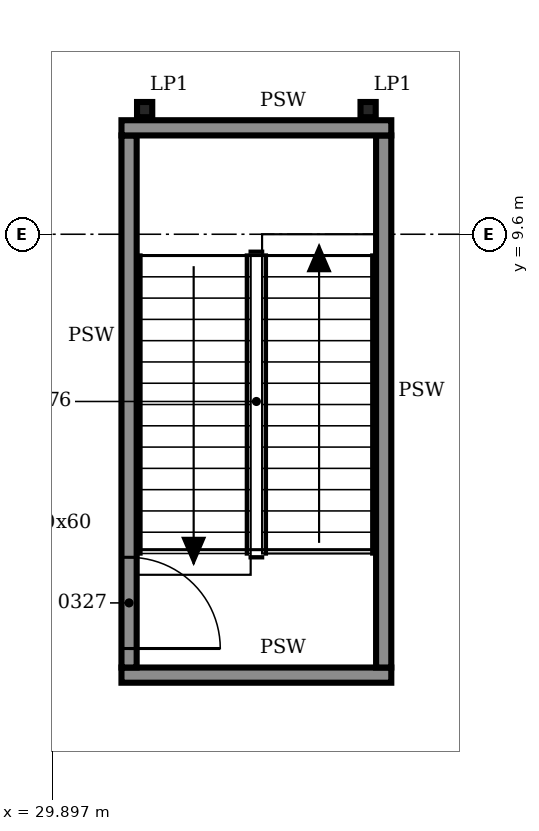
"""IFC4 building model, lengths in metres.
Left out: names, types, materials, properties, quantities, classifications, styles, units other than length and angle.
Written with IfcOpenShell. Run it as: python <this file> out.ifc"""

import sys

from ifc_helpers import new_model, si_unit, direction, frame, frame_2d, origin, origin_2d, place, context, subcontext, project, spatial, rectangle, i_section, extrude, element, fill, save


model = new_model("IFC4")
c1 = context("Model", 3, precision=1e-05, world=origin(), true_north=direction((0.0, 1.0)))
c2 = subcontext(c1, "Body", "Model", "MODEL_VIEW")
j1 = project(units=[si_unit("LENGTHUNIT", "METRE"), si_unit("PLANEANGLEUNIT", "RADIAN")], contexts=[c1])
p1 = place(None, origin())
s1 = spatial("IfcSite", under=j1, at=p1, CompositionType="ELEMENT")
p2 = place(p1, origin())
s2 = spatial("IfcBuilding", under=s1, at=p2, CompositionType="ELEMENT")
p3 = place(p2, frame((0.0, 0.0, 21.0)))
s3 = spatial("IfcBuildingStorey", under=s2, at=p3, CompositionType="ELEMENT", Elevation=21.0)
for number, where, z_axis, x_axis in (
    (1, (31.105, 11.24, 0.0), (0.0, 0.0, 1.0), (1.0, 0.0, 0.0)),
    (2, (34.045, 11.24, 0.0), (0.0, 0.0, 1.0), (1.0, 0.0, 0.0)),
):
    element("IfcColumn", number, at=place(p3, frame(where, z_axis=z_axis, x_axis=x_axis)), inside=s3, PredefinedType="COLUMN", context=c2, shape_type="SweptSolid", body=[
        extrude(i_section(OverallWidth=0.2, OverallDepth=0.2, WebThickness=0.009, FlangeThickness=0.015, FilletRadius=0.018, at=origin_2d()), origin(), (0.0, 0.0, 1.0), 4.8),
    ])
p4 = place(p3, frame((30.8, 3.8, 0.0), z_axis=(0.0, 0.0, 1.0), x_axis=(1.0, 0.0, 0.0)))
e3 = element("IfcWall", 3, at=p4, inside=s3, PredefinedType="SOLIDWALL", context=c2, shape_type="SweptSolid", body=[
    extrude(rectangle(XDim=3.55, YDim=0.2, at=frame_2d((1.775, 0.0))), origin(), (0.0, 0.0, 1.0), 4.6),
])
p5 = place(p3, frame((30.9, 3.9, 0.0), z_axis=(0.0, 0.0, 1.0), x_axis=(0.0, 1.0, 0.0)))
e4 = element("IfcWall", 4, at=p5, inside=s3, PredefinedType="SOLIDWALL", context=c2, shape_type="SweptSolid", body=[
    extrude(rectangle(XDim=7.0, YDim=0.2, at=frame_2d((3.5, 0.0))), origin(), (0.0, 0.0, 1.0), 4.6),
])
p6 = place(p5, frame((0.25, 0.0, 0.0)))
e5 = element("IfcOpeningElement", 5, at=p6, cuts=e4, PredefinedType="OPENING", context=c2, shape_type="SweptSolid", body=[
    extrude(rectangle(XDim=1.2, YDim=2.1, at=frame_2d((0.6, 1.05))), frame((0.0, 0.11, 0.0), z_axis=(0.0, -1.0, 0.0), x_axis=(1.0, 0.0, 0.0)), (0.0, 0.0, 1.0), 0.22),
])
p7 = place(p3, frame((34.25, 3.9, 0.0), z_axis=(0.0, 0.0, 1.0), x_axis=(0.0, 1.0, 0.0)))
e6 = element("IfcWall", 6, at=p7, inside=s3, PredefinedType="SOLIDWALL", context=c2, shape_type="SweptSolid", body=[
    extrude(rectangle(XDim=7.0, YDim=0.2, at=frame_2d((3.5, 0.0))), origin(), (0.0, 0.0, 1.0), 4.6),
])
p8 = place(p3, frame((30.8, 11.0, 0.0), z_axis=(0.0, 0.0, 1.0), x_axis=(1.0, 0.0, 0.0)))
e7 = element("IfcWall", 7, at=p8, inside=s3, PredefinedType="SOLIDWALL", context=c2, shape_type="SweptSolid", body=[
    extrude(rectangle(XDim=3.55, YDim=0.2, at=frame_2d((1.775, 0.0))), origin(), (0.0, 0.0, 1.0), 4.6),
])
p9 = place(p6, frame((1.2, 0.0, 0.0), z_axis=(0.0, 0.0, 1.0), x_axis=(-1.0, 0.0, 0.0)))
e8 = element("IfcDoor", 8, at=p9, inside=s3, OperationType="SINGLE_SWING_RIGHT", PredefinedType="DOOR", context=c2, shape_type="SweptSolid", body=[
    extrude(rectangle(XDim=1.2, YDim=2.1, at=frame_2d((0.6, 1.05))), frame((0.0, 0.025, 0.0), z_axis=(0.0, -1.0, 0.0), x_axis=(1.0, 0.0, 0.0)), (0.0, 0.0, 1.0), 0.05),
])
fill(e5, e8)
save(model, sys.argv[1])
